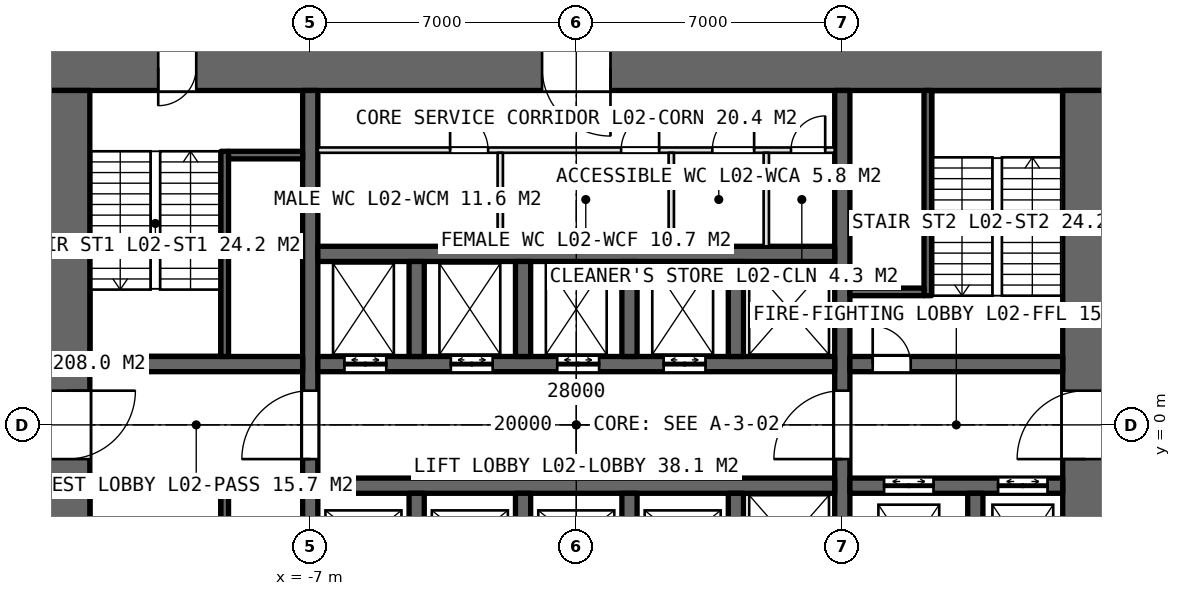
"""IFC4 building model, lengths in metres.
Left out: names, types, materials, properties, quantities, classifications, styles, units other than length and angle.
Written with IfcOpenShell. Run it as: python <this file> out.ifc"""

import sys

from ifc_helpers import new_model, si_unit, direction, frame, frame_2d, origin, place, context, subcontext, project, spatial, rectangle, extrude, element, fill, save


model = new_model("IFC4")
c1 = context("Model", 3, precision=1e-05, world=origin(), true_north=direction((0.0, 1.0)))
c2 = subcontext(c1, "Body", "Model", "MODEL_VIEW")
j1 = project(units=[si_unit("LENGTHUNIT", "METRE"), si_unit("PLANEANGLEUNIT", "RADIAN")], contexts=[c1])
p1 = place(None, origin())
s1 = spatial("IfcSite", under=j1, at=p1, CompositionType="ELEMENT")
p2 = place(p1, origin())
s2 = spatial("IfcBuilding", under=s1, at=p2, CompositionType="ELEMENT")
p3 = place(p2, frame((0.0, 0.0, 10.0)))
s3 = spatial("IfcBuildingStorey", under=s2, at=p3, CompositionType="ELEMENT", Elevation=10.0)
p4 = place(p3, frame((14.0, 9.4, 0.0), z_axis=(0.0, 0.0, 1.0), x_axis=(-1.0, 0.0, 0.0)))
e1 = element("IfcWall", 1, at=p4, inside=s3, PredefinedType="SHEAR", context=c2, shape_type="SweptSolid", body=[
    extrude(rectangle(XDim=28.0, YDim=1.2, at=frame_2d((14.0, 0.0))), origin(), (0.0, 0.0, 1.0), 5.0),
])
p5 = place(p4, frame((24.0, 0.0, 0.0)))
e2 = element("IfcOpeningElement", 2, at=p5, cuts=e1, PredefinedType="OPENING", context=c2, shape_type="SweptSolid", body=[
    extrude(rectangle(XDim=1.0, YDim=2.4, at=frame_2d((0.5, 1.2))), frame((0.0, 0.61, 0.0), z_axis=(0.0, -1.0, 0.0), x_axis=(1.0, 0.0, 0.0)), (0.0, 0.0, 1.0), 1.22),
])
p6 = place(p4, frame((13.1, 0.0, 0.0)))
e3 = element("IfcOpeningElement", 3, at=p6, cuts=e1, PredefinedType="OPENING", context=c2, shape_type="SweptSolid", body=[
    extrude(rectangle(XDim=1.8, YDim=2.4, at=frame_2d((0.9, 1.2))), frame((0.0, 0.61, 0.0), z_axis=(0.0, -1.0, 0.0), x_axis=(1.0, 0.0, 0.0)), (0.0, 0.0, 1.0), 1.22),
])
p7 = place(p3, frame((-13.4, 8.8, 0.0), z_axis=(0.0, 0.0, 1.0), x_axis=(0.0, -1.0, 0.0)))
e4 = element("IfcWall", 4, at=p7, inside=s3, PredefinedType="SHEAR", context=c2, shape_type="SweptSolid", body=[
    extrude(rectangle(XDim=17.6, YDim=1.2, at=frame_2d((8.8, 0.0))), origin(), (0.0, 0.0, 1.0), 5.0),
])
p8 = place(p7, frame((7.9, 0.0, 0.0)))
e5 = element("IfcOpeningElement", 5, at=p8, cuts=e4, PredefinedType="OPENING", context=c2, shape_type="SweptSolid", body=[
    extrude(rectangle(XDim=1.8, YDim=2.4, at=frame_2d((0.9, 1.2))), frame((0.0, 0.61, 0.0), z_axis=(0.0, -1.0, 0.0), x_axis=(1.0, 0.0, 0.0)), (0.0, 0.0, 1.0), 1.22),
])
p9 = place(p7, frame((16.5, 0.0, 0.0)))
e6 = element("IfcOpeningElement", 6, at=p9, cuts=e4, PredefinedType="OPENING", context=c2, shape_type="SweptSolid", body=[
    extrude(rectangle(XDim=1.0, YDim=2.4, at=frame_2d((0.5, 1.2))), frame((0.0, 0.61, 0.0), z_axis=(0.0, -1.0, 0.0), x_axis=(1.0, 0.0, 0.0)), (0.0, 0.0, 1.0), 1.22),
])
p10 = place(p3, frame((13.4, -8.8, 0.0), z_axis=(0.0, 0.0, 1.0), x_axis=(0.0, 1.0, 0.0)))
e7 = element("IfcWall", 7, at=p10, inside=s3, PredefinedType="SHEAR", context=c2, shape_type="SweptSolid", body=[
    extrude(rectangle(XDim=17.6, YDim=1.2, at=frame_2d((8.8, 0.0))), origin(), (0.0, 0.0, 1.0), 5.0),
])
p11 = place(p10, frame((7.9, 0.0, 0.0)))
e8 = element("IfcOpeningElement", 8, at=p11, cuts=e7, PredefinedType="OPENING", context=c2, shape_type="SweptSolid", body=[
    extrude(rectangle(XDim=1.8, YDim=2.4, at=frame_2d((0.9, 1.2))), frame((0.0, 0.61, 0.0), z_axis=(0.0, -1.0, 0.0), x_axis=(1.0, 0.0, 0.0)), (0.0, 0.0, 1.0), 1.22),
])
p12 = place(p3, frame((-7.0, -8.8, 0.0), z_axis=(0.0, 0.0, 1.0), x_axis=(0.0, 1.0, 0.0)))
e9 = element("IfcWall", 9, at=p12, inside=s3, PredefinedType="SHEAR", context=c2, shape_type="SweptSolid", body=[
    extrude(rectangle(XDim=17.6, YDim=0.4, at=frame_2d((8.8, 0.0))), origin(), (0.0, 0.0, 1.0), 5.0),
])
p13 = place(p12, frame((7.9, 0.0, 0.0)))
e10 = element("IfcOpeningElement", 10, at=p13, cuts=e9, PredefinedType="OPENING", context=c2, shape_type="SweptSolid", body=[
    extrude(rectangle(XDim=1.8, YDim=2.4, at=frame_2d((0.9, 1.2))), frame((0.0, 0.21, 0.0), z_axis=(0.0, -1.0, 0.0), x_axis=(1.0, 0.0, 0.0)), (0.0, 0.0, 1.0), 0.42),
])
p14 = place(p3, frame((7.0, -8.8, 0.0), z_axis=(0.0, 0.0, 1.0), x_axis=(0.0, 1.0, 0.0)))
e11 = element("IfcWall", 11, at=p14, inside=s3, PredefinedType="SHEAR", context=c2, shape_type="SweptSolid", body=[
    extrude(rectangle(XDim=17.6, YDim=0.4, at=frame_2d((8.8, 0.0))), origin(), (0.0, 0.0, 1.0), 5.0),
])
p15 = place(p14, frame((7.9, 0.0, 0.0)))
e12 = element("IfcOpeningElement", 12, at=p15, cuts=e11, PredefinedType="OPENING", context=c2, shape_type="SweptSolid", body=[
    extrude(rectangle(XDim=1.8, YDim=2.4, at=frame_2d((0.9, 1.2))), frame((0.0, 0.21, 0.0), z_axis=(0.0, -1.0, 0.0), x_axis=(1.0, 0.0, 0.0)), (0.0, 0.0, 1.0), 0.42),
])
p16 = place(p3, frame((-6.8, 1.6, 0.0), z_axis=(0.0, 0.0, 1.0), x_axis=(1.0, 0.0, 0.0)))
e13 = element("IfcWall", 13, at=p16, inside=s3, PredefinedType="SHEAR", context=c2, shape_type="SweptSolid", body=[
    extrude(rectangle(XDim=13.6, YDim=0.4, at=frame_2d((6.8, 0.0))), origin(), (0.0, 0.0, 1.0), 5.0),
])
p17 = place(p16, frame((0.7, 0.0, 0.0)))
e14 = element("IfcOpeningElement", 14, at=p17, cuts=e13, PredefinedType="OPENING", context=c2, shape_type="SweptSolid", body=[
    extrude(rectangle(XDim=1.1, YDim=2.4, at=frame_2d((0.55, 1.2))), frame((0.0, 0.21, 0.0), z_axis=(0.0, -1.0, 0.0), x_axis=(1.0, 0.0, 0.0)), (0.0, 0.0, 1.0), 0.42),
])
p18 = place(p16, frame((3.5, 0.0, 0.0)))
e15 = element("IfcOpeningElement", 15, at=p18, cuts=e13, PredefinedType="OPENING", context=c2, shape_type="SweptSolid", body=[
    extrude(rectangle(XDim=1.1, YDim=2.4, at=frame_2d((0.55, 1.2))), frame((0.0, 0.21, 0.0), z_axis=(0.0, -1.0, 0.0), x_axis=(1.0, 0.0, 0.0)), (0.0, 0.0, 1.0), 0.42),
])
p19 = place(p16, frame((6.3, 0.0, 0.0)))
e16 = element("IfcOpeningElement", 16, at=p19, cuts=e13, PredefinedType="OPENING", context=c2, shape_type="SweptSolid", body=[
    extrude(rectangle(XDim=1.1, YDim=2.4, at=frame_2d((0.55, 1.2))), frame((0.0, 0.21, 0.0), z_axis=(0.0, -1.0, 0.0), x_axis=(1.0, 0.0, 0.0)), (0.0, 0.0, 1.0), 0.42),
])
p20 = place(p16, frame((9.1, 0.0, 0.0)))
e17 = element("IfcOpeningElement", 17, at=p20, cuts=e13, PredefinedType="OPENING", context=c2, shape_type="SweptSolid", body=[
    extrude(rectangle(XDim=1.1, YDim=2.4, at=frame_2d((0.55, 1.2))), frame((0.0, 0.21, 0.0), z_axis=(0.0, -1.0, 0.0), x_axis=(1.0, 0.0, 0.0)), (0.0, 0.0, 1.0), 0.42),
])
for number, where, z_axis, x_axis in (
    (18, (-6.8, -1.6, 0.0), (0.0, 0.0, 1.0), (1.0, 0.0, 0.0)),
    (19, (-6.8, 4.5, 0.0), (0.0, 0.0, 1.0), (1.0, 0.0, 0.0)),
):
    element("IfcWall", number, at=place(p3, frame(where, z_axis=z_axis, x_axis=x_axis)), inside=s3, PredefinedType="SHEAR", context=c2, shape_type="SweptSolid", body=[
        extrude(rectangle(XDim=13.6, YDim=0.4, at=frame_2d((6.8, 0.0))), origin(), (0.0, 0.0, 1.0), 5.0),
    ])
for number, where, z_axis, x_axis in (
    (20, (-12.8, 1.6, 0.0), (0.0, 0.0, 1.0), (1.0, 0.0, 0.0)),
    (21, (-12.8, -1.6, 0.0), (0.0, 0.0, 1.0), (1.0, 0.0, 0.0)),
):
    element("IfcWall", number, at=place(p3, frame(where, z_axis=z_axis, x_axis=x_axis)), inside=s3, PredefinedType="SHEAR", context=c2, shape_type="SweptSolid", body=[
        extrude(rectangle(XDim=5.6, YDim=0.4, at=frame_2d((2.8, 0.0))), origin(), (0.0, 0.0, 1.0), 5.0),
    ])
p21 = place(p3, frame((7.2, 1.6, 0.0), z_axis=(0.0, 0.0, 1.0), x_axis=(1.0, 0.0, 0.0)))
e22 = element("IfcWall", 22, at=p21, inside=s3, PredefinedType="SHEAR", context=c2, shape_type="SweptSolid", body=[
    extrude(rectangle(XDim=5.6, YDim=0.4, at=frame_2d((2.8, 0.0))), origin(), (0.0, 0.0, 1.0), 5.0),
])
p22 = place(p21, frame((0.6, 0.0, 0.0)))
e23 = element("IfcOpeningElement", 23, at=p22, cuts=e22, PredefinedType="OPENING", context=c2, shape_type="SweptSolid", body=[
    extrude(rectangle(XDim=1.0, YDim=2.4, at=frame_2d((0.5, 1.2))), frame((0.0, 0.21, 0.0), z_axis=(0.0, -1.0, 0.0), x_axis=(1.0, 0.0, 0.0)), (0.0, 0.0, 1.0), 0.42),
])
p23 = place(p3, frame((7.2, -1.6, 0.0), z_axis=(0.0, 0.0, 1.0), x_axis=(1.0, 0.0, 0.0)))
e24 = element("IfcWall", 24, at=p23, inside=s3, PredefinedType="SHEAR", context=c2, shape_type="SweptSolid", body=[
    extrude(rectangle(XDim=5.6, YDim=0.4, at=frame_2d((2.8, 0.0))), origin(), (0.0, 0.0, 1.0), 5.0),
])
p24 = place(p23, frame((0.9, 0.0, 0.0)))
e25 = element("IfcOpeningElement", 25, at=p24, cuts=e24, PredefinedType="OPENING", context=c2, shape_type="SweptSolid", body=[
    extrude(rectangle(XDim=1.3, YDim=2.4, at=frame_2d((0.65, 1.2))), frame((0.0, 0.21, 0.0), z_axis=(0.0, -1.0, 0.0), x_axis=(1.0, 0.0, 0.0)), (0.0, 0.0, 1.0), 0.42),
])
p25 = place(p23, frame((3.9, 0.0, 0.0)))
e26 = element("IfcOpeningElement", 26, at=p25, cuts=e24, PredefinedType="OPENING", context=c2, shape_type="SweptSolid", body=[
    extrude(rectangle(XDim=1.3, YDim=2.4, at=frame_2d((0.65, 1.2))), frame((0.0, 0.21, 0.0), z_axis=(0.0, -1.0, 0.0), x_axis=(1.0, 0.0, 0.0)), (0.0, 0.0, 1.0), 0.42),
])
p26 = place(p3, frame((10.5, -4.8, 0.0), z_axis=(0.0, 0.0, 1.0), x_axis=(0.0, 1.0, 0.0)))
e27 = element("IfcWall", 27, at=p26, inside=s3, PredefinedType="SHEAR", context=c2, shape_type="SweptSolid", body=[
    extrude(rectangle(XDim=3.0, YDim=0.4, at=frame_2d((1.5, 0.0))), origin(), (0.0, 0.0, 1.0), 5.0),
])
for number, where, z_axis, x_axis in (
    (28, (-4.2, 1.8, 0.0), (0.0, 0.0, 1.0), (0.0, 1.0, 0.0)),
    (29, (-4.2, -4.3, 0.0), (0.0, 0.0, 1.0), (0.0, 1.0, 0.0)),
    (30, (-1.4, 1.8, 0.0), (0.0, 0.0, 1.0), (0.0, 1.0, 0.0)),
    (31, (-1.4, -4.3, 0.0), (0.0, 0.0, 1.0), (0.0, 1.0, 0.0)),
    (32, (1.4, 1.8, 0.0), (0.0, 0.0, 1.0), (0.0, 1.0, 0.0)),
    (33, (1.4, -4.3, 0.0), (0.0, 0.0, 1.0), (0.0, 1.0, 0.0)),
    (34, (4.2, 1.8, 0.0), (0.0, 0.0, 1.0), (0.0, 1.0, 0.0)),
    (35, (4.2, -4.3, 0.0), (0.0, 0.0, 1.0), (0.0, 1.0, 0.0)),
):
    element("IfcWall", number, at=place(p3, frame(where, z_axis=z_axis, x_axis=x_axis)), inside=s3, PredefinedType="SHEAR", context=c2, shape_type="SweptSolid", body=[
        extrude(rectangle(XDim=2.5, YDim=0.4, at=frame_2d((1.25, 0.0))), origin(), (0.0, 0.0, 1.0), 5.0),
    ])
p27 = place(p3, frame((-6.8, 7.23, 0.0), z_axis=(0.0, 0.0, 1.0), x_axis=(1.0, 0.0, 0.0)))
e36 = element("IfcWall", 36, at=p27, inside=s3, PredefinedType="PARTITIONING", context=c2, shape_type="SweptSolid", body=[
    extrude(rectangle(XDim=13.6, YDim=0.14, at=frame_2d((6.8, 0.0))), origin(), (0.0, 0.0, 1.0), 4.75),
])
p28 = place(p27, frame((3.48, 0.0, 0.0)))
e37 = element("IfcOpeningElement", 37, at=p28, cuts=e36, PredefinedType="OPENING", context=c2, shape_type="SweptSolid", body=[
    extrude(rectangle(XDim=1.0, YDim=2.4, at=frame_2d((0.5, 1.2))), frame((0.0, 0.08, 0.0), z_axis=(0.0, -1.0, 0.0), x_axis=(1.0, 0.0, 0.0)), (0.0, 0.0, 1.0), 0.16),
])
p29 = place(p27, frame((7.98, 0.0, 0.0)))
e38 = element("IfcOpeningElement", 38, at=p29, cuts=e36, PredefinedType="OPENING", context=c2, shape_type="SweptSolid", body=[
    extrude(rectangle(XDim=1.0, YDim=2.4, at=frame_2d((0.5, 1.2))), frame((0.0, 0.08, 0.0), z_axis=(0.0, -1.0, 0.0), x_axis=(1.0, 0.0, 0.0)), (0.0, 0.0, 1.0), 0.16),
])
p30 = place(p27, frame((10.38, 0.0, 0.0)))
e39 = element("IfcOpeningElement", 39, at=p30, cuts=e36, PredefinedType="OPENING", context=c2, shape_type="SweptSolid", body=[
    extrude(rectangle(XDim=1.1, YDim=2.4, at=frame_2d((0.55, 1.2))), frame((0.0, 0.08, 0.0), z_axis=(0.0, -1.0, 0.0), x_axis=(1.0, 0.0, 0.0)), (0.0, 0.0, 1.0), 0.16),
])
p31 = place(p27, frame((12.45, 0.0, 0.0)))
e40 = element("IfcOpeningElement", 40, at=p31, cuts=e36, PredefinedType="OPENING", context=c2, shape_type="SweptSolid", body=[
    extrude(rectangle(XDim=0.9, YDim=2.4, at=frame_2d((0.45, 1.2))), frame((0.0, 0.08, 0.0), z_axis=(0.0, -1.0, 0.0), x_axis=(1.0, 0.0, 0.0)), (0.0, 0.0, 1.0), 0.16),
])
for number, where, z_axis, x_axis in (
    (41, (-2.0, 4.7, 0.0), (0.0, 0.0, 1.0), (0.0, 1.0, 0.0)),
    (42, (2.5, 4.7, 0.0), (0.0, 0.0, 1.0), (0.0, 1.0, 0.0)),
    (43, (5.0, 4.7, 0.0), (0.0, 0.0, 1.0), (0.0, 1.0, 0.0)),
):
    element("IfcWall", number, at=place(p3, frame(where, z_axis=z_axis, x_axis=x_axis)), inside=s3, PredefinedType="PARTITIONING", context=c2, shape_type="SweptSolid", body=[
        extrude(rectangle(XDim=2.46, YDim=0.14, at=frame_2d((1.23, 0.0))), origin(), (0.0, 0.0, 1.0), 4.75),
    ])
p32 = place(p3, frame((-9.25, 7.2, 0.0), z_axis=(0.0, 0.0, 1.0), x_axis=(0.0, -1.0, 0.0)))
e44 = element("IfcWall", 44, at=p32, inside=s3, PredefinedType="SOLIDWALL", context=c2, shape_type="SweptSolid", body=[
    extrude(rectangle(XDim=5.4, YDim=0.2, at=frame_2d((2.7, 0.0))), origin(), (0.0, 0.0, 1.0), 5.0),
])
p33 = place(p3, frame((-9.15, 7.1, 0.0), z_axis=(0.0, 0.0, 1.0), x_axis=(1.0, 0.0, 0.0)))
e45 = element("IfcWall", 45, at=p33, inside=s3, PredefinedType="SOLIDWALL", context=c2, shape_type="SweptSolid", body=[
    extrude(rectangle(XDim=1.95, YDim=0.2, at=frame_2d((0.975, 0.0))), origin(), (0.0, 0.0, 1.0), 5.0),
])
p34 = place(p3, frame((-9.25, -7.2, 0.0), z_axis=(0.0, 0.0, 1.0), x_axis=(0.0, 1.0, 0.0)))
e46 = element("IfcWall", 46, at=p34, inside=s3, PredefinedType="SOLIDWALL", context=c2, shape_type="SweptSolid", body=[
    extrude(rectangle(XDim=5.4, YDim=0.2, at=frame_2d((2.7, 0.0))), origin(), (0.0, 0.0, 1.0), 5.0),
])
p35 = place(p3, frame((9.25, 3.4, 0.0), z_axis=(0.0, 0.0, 1.0), x_axis=(0.0, 1.0, 0.0)))
e47 = element("IfcWall", 47, at=p35, inside=s3, PredefinedType="SOLIDWALL", context=c2, shape_type="SweptSolid", body=[
    extrude(rectangle(XDim=5.4, YDim=0.2, at=frame_2d((2.7, 0.0))), origin(), (0.0, 0.0, 1.0), 5.0),
])
p36 = place(p3, frame((9.15, 3.5, 0.0), z_axis=(0.0, 0.0, 1.0), x_axis=(-1.0, 0.0, 0.0)))
e48 = element("IfcWall", 48, at=p36, inside=s3, PredefinedType="SOLIDWALL", context=c2, shape_type="SweptSolid", body=[
    extrude(rectangle(XDim=1.95, YDim=0.2, at=frame_2d((0.975, 0.0))), origin(), (0.0, 0.0, 1.0), 5.0),
])
p37 = place(p8, origin())
e49 = element("IfcDoor", 49, at=p37, inside=s3, OperationType="DOUBLE_DOOR_SINGLE_SWING", PredefinedType="DOOR", context=c2, shape_type="SweptSolid", body=[
    extrude(rectangle(XDim=1.8, YDim=2.4, at=frame_2d((0.9, 1.2))), frame((0.0, 0.025, 0.0), z_axis=(0.0, -1.0, 0.0), x_axis=(1.0, 0.0, 0.0)), (0.0, 0.0, 1.0), 0.05),
])
fill(e5, e49)
p38 = place(p11, origin())
e50 = element("IfcDoor", 50, at=p38, inside=s3, OperationType="DOUBLE_DOOR_SINGLE_SWING", PredefinedType="DOOR", context=c2, shape_type="SweptSolid", body=[
    extrude(rectangle(XDim=1.8, YDim=2.4, at=frame_2d((0.9, 1.2))), frame((0.0, 0.025, 0.0), z_axis=(0.0, -1.0, 0.0), x_axis=(1.0, 0.0, 0.0)), (0.0, 0.0, 1.0), 0.05),
])
fill(e8, e50)
p39 = place(p13, origin())
e51 = element("IfcDoor", 51, at=p39, inside=s3, OperationType="DOUBLE_DOOR_SINGLE_SWING", PredefinedType="DOOR", context=c2, shape_type="SweptSolid", body=[
    extrude(rectangle(XDim=1.8, YDim=2.4, at=frame_2d((0.9, 1.2))), frame((0.0, 0.025, 0.0), z_axis=(0.0, -1.0, 0.0), x_axis=(1.0, 0.0, 0.0)), (0.0, 0.0, 1.0), 0.05),
])
fill(e10, e51)
p40 = place(p15, origin())
e52 = element("IfcDoor", 52, at=p40, inside=s3, OperationType="DOUBLE_DOOR_SINGLE_SWING", PredefinedType="DOOR", context=c2, shape_type="SweptSolid", body=[
    extrude(rectangle(XDim=1.8, YDim=2.4, at=frame_2d((0.9, 1.2))), frame((0.0, 0.025, 0.0), z_axis=(0.0, -1.0, 0.0), x_axis=(1.0, 0.0, 0.0)), (0.0, 0.0, 1.0), 0.05),
])
fill(e12, e52)
p41 = place(p5, origin())
e53 = element("IfcDoor", 53, at=p41, inside=s3, OperationType="SINGLE_SWING_RIGHT", PredefinedType="DOOR", context=c2, shape_type="SweptSolid", body=[
    extrude(rectangle(XDim=1.0, YDim=2.4, at=frame_2d((0.5, 1.2))), frame((0.0, 0.025, 0.0), z_axis=(0.0, -1.0, 0.0), x_axis=(1.0, 0.0, 0.0)), (0.0, 0.0, 1.0), 0.05),
])
fill(e2, e53)
p42 = place(p22, origin())
e54 = element("IfcDoor", 54, at=p42, inside=s3, OperationType="SINGLE_SWING_LEFT", PredefinedType="DOOR", context=c2, shape_type="SweptSolid", body=[
    extrude(rectangle(XDim=1.0, YDim=2.4, at=frame_2d((0.5, 1.2))), frame((0.0, 0.025, 0.0), z_axis=(0.0, -1.0, 0.0), x_axis=(1.0, 0.0, 0.0)), (0.0, 0.0, 1.0), 0.05),
])
fill(e23, e54)
p43 = place(p28, origin())
e55 = element("IfcDoor", 55, at=p43, inside=s3, OperationType="SINGLE_SWING_LEFT", PredefinedType="DOOR", context=c2, shape_type="SweptSolid", body=[
    extrude(rectangle(XDim=1.0, YDim=2.4, at=frame_2d((0.5, 1.2))), frame((0.0, 0.025, 0.0), z_axis=(0.0, -1.0, 0.0), x_axis=(1.0, 0.0, 0.0)), (0.0, 0.0, 1.0), 0.05),
])
fill(e37, e55)
p44 = place(p29, origin())
e56 = element("IfcDoor", 56, at=p44, inside=s3, OperationType="SINGLE_SWING_RIGHT", PredefinedType="DOOR", context=c2, shape_type="SweptSolid", body=[
    extrude(rectangle(XDim=1.0, YDim=2.4, at=frame_2d((0.5, 1.2))), frame((0.0, 0.025, 0.0), z_axis=(0.0, -1.0, 0.0), x_axis=(1.0, 0.0, 0.0)), (0.0, 0.0, 1.0), 0.05),
])
fill(e38, e56)
p45 = place(p30, origin())
e57 = element("IfcDoor", 57, at=p45, inside=s3, OperationType="SINGLE_SWING_RIGHT", PredefinedType="DOOR", context=c2, shape_type="SweptSolid", body=[
    extrude(rectangle(XDim=1.1, YDim=2.4, at=frame_2d((0.55, 1.2))), frame((0.0, 0.025, 0.0), z_axis=(0.0, -1.0, 0.0), x_axis=(1.0, 0.0, 0.0)), (0.0, 0.0, 1.0), 0.05),
])
fill(e39, e57)
p46 = place(p31, origin())
e58 = element("IfcDoor", 58, at=p46, inside=s3, OperationType="SINGLE_SWING_RIGHT", PredefinedType="DOOR", context=c2, shape_type="SweptSolid", body=[
    extrude(rectangle(XDim=0.9, YDim=2.4, at=frame_2d((0.45, 1.2))), frame((0.0, 0.025, 0.0), z_axis=(0.0, -1.0, 0.0), x_axis=(1.0, 0.0, 0.0)), (0.0, 0.0, 1.0), 0.05),
])
fill(e40, e58)
p47 = place(p6, origin())
e59 = element("IfcDoor", 59, at=p47, inside=s3, OperationType="DOUBLE_DOOR_SINGLE_SWING", PredefinedType="DOOR", context=c2, shape_type="SweptSolid", body=[
    extrude(rectangle(XDim=1.8, YDim=2.4, at=frame_2d((0.9, 1.2))), frame((0.0, 0.025, 0.0), z_axis=(0.0, -1.0, 0.0), x_axis=(1.0, 0.0, 0.0)), (0.0, 0.0, 1.0), 0.05),
])
fill(e3, e59)
p48 = place(p17, origin())
e60 = element("IfcDoor", 60, at=p48, inside=s3, OperationType="DOUBLE_DOOR_SLIDING", PredefinedType="DOOR", context=c2, shape_type="SweptSolid", body=[
    extrude(rectangle(XDim=1.1, YDim=2.4, at=frame_2d((0.55, 1.2))), frame((0.0, 0.025, 0.0), z_axis=(0.0, -1.0, 0.0), x_axis=(1.0, 0.0, 0.0)), (0.0, 0.0, 1.0), 0.05),
])
fill(e14, e60)
p49 = place(p18, origin())
e61 = element("IfcDoor", 61, at=p49, inside=s3, OperationType="DOUBLE_DOOR_SLIDING", PredefinedType="DOOR", context=c2, shape_type="SweptSolid", body=[
    extrude(rectangle(XDim=1.1, YDim=2.4, at=frame_2d((0.55, 1.2))), frame((0.0, 0.025, 0.0), z_axis=(0.0, -1.0, 0.0), x_axis=(1.0, 0.0, 0.0)), (0.0, 0.0, 1.0), 0.05),
])
fill(e15, e61)
p50 = place(p19, origin())
e62 = element("IfcDoor", 62, at=p50, inside=s3, OperationType="DOUBLE_DOOR_SLIDING", PredefinedType="DOOR", context=c2, shape_type="SweptSolid", body=[
    extrude(rectangle(XDim=1.1, YDim=2.4, at=frame_2d((0.55, 1.2))), frame((0.0, 0.025, 0.0), z_axis=(0.0, -1.0, 0.0), x_axis=(1.0, 0.0, 0.0)), (0.0, 0.0, 1.0), 0.05),
])
fill(e16, e62)
p51 = place(p20, origin())
e63 = element("IfcDoor", 63, at=p51, inside=s3, OperationType="DOUBLE_DOOR_SLIDING", PredefinedType="DOOR", context=c2, shape_type="SweptSolid", body=[
    extrude(rectangle(XDim=1.1, YDim=2.4, at=frame_2d((0.55, 1.2))), frame((0.0, 0.025, 0.0), z_axis=(0.0, -1.0, 0.0), x_axis=(1.0, 0.0, 0.0)), (0.0, 0.0, 1.0), 0.05),
])
fill(e17, e63)
p52 = place(p24, origin())
e64 = element("IfcDoor", 64, at=p52, inside=s3, OperationType="DOUBLE_DOOR_SLIDING", PredefinedType="DOOR", context=c2, shape_type="SweptSolid", body=[
    extrude(rectangle(XDim=1.3, YDim=2.4, at=frame_2d((0.65, 1.2))), frame((0.0, 0.025, 0.0), z_axis=(0.0, -1.0, 0.0), x_axis=(1.0, 0.0, 0.0)), (0.0, 0.0, 1.0), 0.05),
])
fill(e25, e64)
p53 = place(p25, origin())
e65 = element("IfcDoor", 65, at=p53, inside=s3, OperationType="DOUBLE_DOOR_SLIDING", PredefinedType="DOOR", context=c2, shape_type="SweptSolid", body=[
    extrude(rectangle(XDim=1.3, YDim=2.4, at=frame_2d((0.65, 1.2))), frame((0.0, 0.025, 0.0), z_axis=(0.0, -1.0, 0.0), x_axis=(1.0, 0.0, 0.0)), (0.0, 0.0, 1.0), 0.05),
])
fill(e26, e65)
save(model, sys.argv[1])
